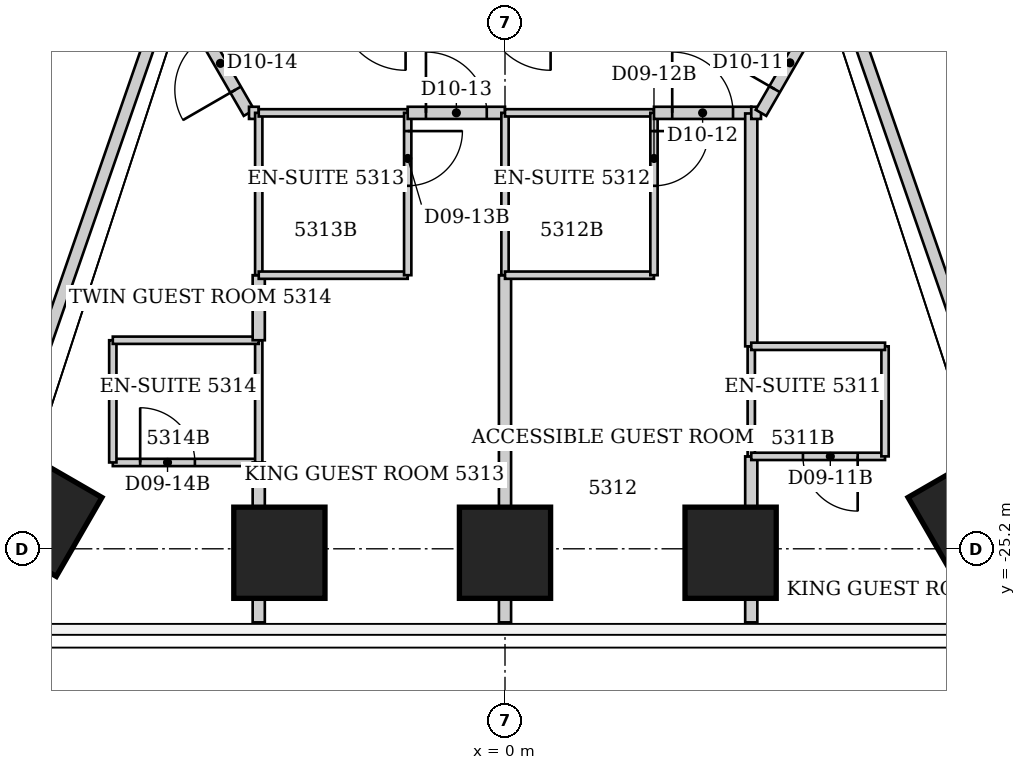
"""IFC4 building model, lengths in metres.
Left out: names, types, materials, properties, quantities, classifications, styles, units other than length and angle.
Written with IfcOpenShell. Run it as: python <this file> out.ifc"""

import sys

from ifc_helpers import new_model, si_unit, direction, frame, frame_2d, origin, origin_2d, place, context, subcontext, project, spatial, rectangle, extrude, element, fill, save


model = new_model("IFC4")
c1 = context("Model", 3, precision=1e-05, world=origin(), true_north=direction((0.0, 1.0)))
c2 = subcontext(c1, "Body", "Model", "MODEL_VIEW")
j1 = project(units=[si_unit("LENGTHUNIT", "METRE"), si_unit("PLANEANGLEUNIT", "RADIAN")], contexts=[c1])
p1 = place(None, origin())
s1 = spatial("IfcSite", under=j1, at=p1, CompositionType="ELEMENT")
p2 = place(p1, origin())
s2 = spatial("IfcBuilding", under=s1, at=p2, CompositionType="ELEMENT")
p3 = place(p2, frame((0.0, 0.0, 213.6)))
s3 = spatial("IfcBuildingStorey", under=s2, at=p3, CompositionType="ELEMENT", Elevation=213.6)
p4 = place(p3, frame((7.979, -24.442, 0.0), z_axis=(0.0, 0.0, 1.0), x_axis=(0.5, -0.866025403784, 0.0)))
e1 = element("IfcColumn", 1, at=p4, inside=s3, PredefinedType="COLUMN", context=c2, shape_type="SweptSolid", body=[
    extrude(rectangle(XDim=1.5, YDim=2.25, at=origin_2d()), origin(), (0.0, 0.0, 1.0), 3.8),
])
for number, where, z_axis, x_axis in (
    (2, (3.71, -25.265, 0.0), (0.0, 0.0, 1.0), (0.0, -1.0, 0.0)),
    (3, (0.0, -25.265, 0.0), (0.0, 0.0, 1.0), (0.0, -1.0, 0.0)),
    (4, (-3.71, -25.265, 0.0), (0.0, 0.0, 1.0), (0.0, -1.0, 0.0)),
):
    element("IfcColumn", number, at=place(p3, frame(where, z_axis=z_axis, x_axis=x_axis)), inside=s3, PredefinedType="COLUMN", context=c2, shape_type="SweptSolid", body=[
        extrude(rectangle(XDim=1.5, YDim=1.5, at=origin_2d()), origin(), (0.0, 0.0, 1.0), 3.8),
    ])
p5 = place(p3, frame((-7.979, -24.442, 0.0), z_axis=(0.0, 0.0, 1.0), x_axis=(-0.5, -0.866025403784, 0.0)))
e5 = element("IfcColumn", 5, at=p5, inside=s3, PredefinedType="COLUMN", context=c2, shape_type="SweptSolid", body=[
    extrude(rectangle(XDim=1.5, YDim=2.25, at=origin_2d()), origin(), (0.0, 0.0, 1.0), 3.8),
])
p6 = place(p3, frame((-9.01, -26.012, 0.0), z_axis=(0.0, 0.0, 1.0), x_axis=(0.327582991606, 0.944822408504, 0.0)))
e6 = element("IfcWall", 6, at=p6, inside=s3, PredefinedType="PARTITIONING", context=c2, shape_type="SweptSolid", body=[
    extrude(rectangle(XDim=10.667, YDim=0.2, at=frame_2d((5.333, 0.0))), origin(), (0.0, 0.0, 1.0), 3.64),
])
p7 = place(p3, frame((-6.45, -23.78, 0.0), z_axis=(0.0, 0.0, 1.0), x_axis=(1.0, 0.0, 0.0)))
e7 = element("IfcWall", 7, at=p7, inside=s3, PredefinedType="PARTITIONING", context=c2, shape_type="SweptSolid", body=[
    extrude(rectangle(XDim=2.4, YDim=0.12, at=frame_2d((1.2, 0.0))), origin(), (0.0, 0.0, 1.0), 3.64),
])
p8 = place(p7, frame((0.45, 0.0, 0.0)))
e8 = element("IfcOpeningElement", 8, at=p8, cuts=e7, PredefinedType="OPENING", context=c2, shape_type="SweptSolid", body=[
    extrude(rectangle(XDim=0.9, YDim=2.03, at=frame_2d((0.45, 1.015))), frame((0.0, 0.06, 0.0), z_axis=(0.0, -1.0, 0.0), x_axis=(1.0, 0.0, 0.0)), (0.0, 0.0, 1.0), 0.12),
])
p9 = place(p3, frame((-6.45, -21.77, 0.0), z_axis=(0.0, 0.0, 1.0), x_axis=(0.0, -1.0, 0.0)))
e9 = element("IfcWall", 9, at=p9, inside=s3, PredefinedType="PARTITIONING", context=c2, shape_type="SweptSolid", body=[
    extrude(rectangle(XDim=2.01, YDim=0.12, at=frame_2d((1.005, 0.0))), origin(), (0.0, 0.0, 1.0), 3.64),
])
p10 = place(p3, frame((-5.48, -15.83, 0.0), z_axis=(0.0, 0.0, 1.0), x_axis=(0.499963722229, -0.866046347752, 0.0)))
e10 = element("IfcWall", 10, at=p10, inside=s3, PredefinedType="PARTITIONING", context=c2, shape_type="SweptSolid", body=[
    extrude(rectangle(XDim=2.54, YDim=0.2, at=frame_2d((1.27, 0.0))), origin(), (0.0, 0.0, 1.0), 3.64),
])
p11 = place(p10, frame((1.1, 0.0, 0.0)))
e11 = element("IfcOpeningElement", 11, at=p11, cuts=e10, PredefinedType="OPENING", context=c2, shape_type="SweptSolid", body=[
    extrude(rectangle(XDim=1.0, YDim=2.13, at=frame_2d((0.5, 1.065))), frame((0.0, 0.1, 0.0), z_axis=(0.0, -1.0, 0.0), x_axis=(1.0, 0.0, 0.0)), (0.0, 0.0, 1.0), 0.2),
])
p12 = place(p3, frame((-4.21, -18.03, 0.0), z_axis=(0.0, 0.0, 1.0), x_axis=(1.0, 0.0, 0.0)))
e12 = element("IfcWall", 12, at=p12, inside=s3, PredefinedType="PARTITIONING", context=c2, shape_type="SweptSolid", body=[
    extrude(rectangle(XDim=0.16, YDim=0.2, at=frame_2d((0.08, 0.0))), origin(), (0.0, 0.0, 1.0), 3.64),
])
p13 = place(p3, frame((-4.05, -26.41, 0.0), z_axis=(0.0, 0.0, 1.0), x_axis=(0.0, 1.0, 0.0)))
e13 = element("IfcWall", 13, at=p13, inside=s3, PredefinedType="PARTITIONING", context=c2, shape_type="SweptSolid", body=[
    extrude(rectangle(XDim=2.63, YDim=0.2, at=frame_2d((1.315, 0.0))), origin(), (0.0, 0.0, 1.0), 3.64),
])
p14 = place(p3, frame((-4.05, -23.78, 0.0), z_axis=(0.0, 0.0, 1.0), x_axis=(0.0, 1.0, 0.0)))
e14 = element("IfcWall", 14, at=p14, inside=s3, PredefinedType="PARTITIONING", context=c2, shape_type="SweptSolid", body=[
    extrude(rectangle(XDim=2.01, YDim=0.12, at=frame_2d((1.005, 0.0))), origin(), (0.0, 0.0, 1.0), 3.64),
])
p15 = place(p3, frame((-4.05, -21.77, 0.0), z_axis=(0.0, 0.0, 1.0), x_axis=(-1.0, 0.0, 0.0)))
e15 = element("IfcWall", 15, at=p15, inside=s3, PredefinedType="PARTITIONING", context=c2, shape_type="SweptSolid", body=[
    extrude(rectangle(XDim=2.4, YDim=0.12, at=frame_2d((1.2, 0.0))), origin(), (0.0, 0.0, 1.0), 3.64),
])
p16 = place(p3, frame((-4.05, -21.77, 0.0), z_axis=(0.0, 0.0, 1.0), x_axis=(0.0, 1.0, 0.0)))
e16 = element("IfcWall", 16, at=p16, inside=s3, PredefinedType="PARTITIONING", context=c2, shape_type="SweptSolid", body=[
    extrude(rectangle(XDim=1.07, YDim=0.2, at=frame_2d((0.535, 0.0))), origin(), (0.0, 0.0, 1.0), 3.64),
])
p17 = place(p3, frame((-4.05, -20.7, 0.0), z_axis=(0.0, 0.0, 1.0), x_axis=(0.0, 1.0, 0.0)))
e17 = element("IfcWall", 17, at=p17, inside=s3, PredefinedType="PARTITIONING", context=c2, shape_type="SweptSolid", body=[
    extrude(rectangle(XDim=2.67, YDim=0.12, at=frame_2d((1.335, 0.0))), origin(), (0.0, 0.0, 1.0), 3.64),
])
for number, where, z_axis, x_axis in (
    (18, (-4.05, -20.7, 0.0), (0.0, 0.0, 1.0), (1.0, 0.0, 0.0)),
    (19, (-4.05, -18.03, 0.0), (0.0, 0.0, 1.0), (1.0, 0.0, 0.0)),
):
    element("IfcWall", number, at=place(p3, frame(where, z_axis=z_axis, x_axis=x_axis)), inside=s3, PredefinedType="PARTITIONING", context=c2, shape_type="SweptSolid", body=[
        extrude(rectangle(XDim=2.45, YDim=0.12, at=frame_2d((1.225, 0.0))), origin(), (0.0, 0.0, 1.0), 3.64),
    ])
p18 = place(p3, frame((-1.6, -20.7, 0.0), z_axis=(0.0, 0.0, 1.0), x_axis=(0.0, 1.0, 0.0)))
e20 = element("IfcWall", 20, at=p18, inside=s3, PredefinedType="PARTITIONING", context=c2, shape_type="SweptSolid", body=[
    extrude(rectangle(XDim=2.67, YDim=0.12, at=frame_2d((1.335, 0.0))), origin(), (0.0, 0.0, 1.0), 3.64),
])
p19 = place(p18, frame((1.47, 0.0, 0.0)))
e21 = element("IfcOpeningElement", 21, at=p19, cuts=e20, PredefinedType="OPENING", context=c2, shape_type="SweptSolid", body=[
    extrude(rectangle(XDim=0.9, YDim=2.03, at=frame_2d((0.45, 1.015))), frame((0.0, 0.06, 0.0), z_axis=(0.0, -1.0, 0.0), x_axis=(1.0, 0.0, 0.0)), (0.0, 0.0, 1.0), 0.12),
])
p20 = place(p3, frame((-1.6, -18.03, 0.0), z_axis=(0.0, 0.0, 1.0), x_axis=(1.0, 0.0, 0.0)))
e22 = element("IfcWall", 22, at=p20, inside=s3, PredefinedType="PARTITIONING", context=c2, shape_type="SweptSolid", body=[
    extrude(rectangle(XDim=1.6, YDim=0.2, at=frame_2d((0.8, 0.0))), origin(), (0.0, 0.0, 1.0), 3.64),
])
p21 = place(p20, frame((0.3, 0.0, 0.0)))
e23 = element("IfcOpeningElement", 23, at=p21, cuts=e22, PredefinedType="OPENING", context=c2, shape_type="SweptSolid", body=[
    extrude(rectangle(XDim=1.0, YDim=2.13, at=frame_2d((0.5, 1.065))), frame((0.0, 0.1, 0.0), z_axis=(0.0, -1.0, 0.0), x_axis=(1.0, 0.0, 0.0)), (0.0, 0.0, 1.0), 0.2),
])
p22 = place(p3, frame((0.0, -26.41, 0.0), z_axis=(0.0, 0.0, 1.0), x_axis=(0.0, 1.0, 0.0)))
e24 = element("IfcWall", 24, at=p22, inside=s3, PredefinedType="PARTITIONING", context=c2, shape_type="SweptSolid", body=[
    extrude(rectangle(XDim=5.71, YDim=0.2, at=frame_2d((2.855, 0.0))), origin(), (0.0, 0.0, 1.0), 2.726),
])
p23 = place(p3, frame((0.0, -20.7, 0.0), z_axis=(0.0, 0.0, 1.0), x_axis=(0.0, 1.0, 0.0)))
e25 = element("IfcWall", 25, at=p23, inside=s3, PredefinedType="PARTITIONING", context=c2, shape_type="SweptSolid", body=[
    extrude(rectangle(XDim=2.67, YDim=0.12, at=frame_2d((1.335, 0.0))), origin(), (0.0, 0.0, 1.0), 2.726),
])
for number, where, z_axis, x_axis in (
    (26, (0.0, -20.7, 0.0), (0.0, 0.0, 1.0), (1.0, 0.0, 0.0)),
    (27, (0.0, -18.03, 0.0), (0.0, 0.0, 1.0), (1.0, 0.0, 0.0)),
):
    element("IfcWall", number, at=place(p3, frame(where, z_axis=z_axis, x_axis=x_axis)), inside=s3, PredefinedType="PARTITIONING", context=c2, shape_type="SweptSolid", body=[
        extrude(rectangle(XDim=2.45, YDim=0.12, at=frame_2d((1.225, 0.0))), origin(), (0.0, 0.0, 1.0), 3.64),
    ])
p24 = place(p3, frame((2.45, -20.7, 0.0), z_axis=(0.0, 0.0, 1.0), x_axis=(0.0, 1.0, 0.0)))
e28 = element("IfcWall", 28, at=p24, inside=s3, PredefinedType="PARTITIONING", context=c2, shape_type="SweptSolid", body=[
    extrude(rectangle(XDim=2.67, YDim=0.12, at=frame_2d((1.335, 0.0))), origin(), (0.0, 0.0, 1.0), 3.64),
])
p25 = place(p24, frame((1.47, 0.0, 0.0)))
e29 = element("IfcOpeningElement", 29, at=p25, cuts=e28, PredefinedType="OPENING", context=c2, shape_type="SweptSolid", body=[
    extrude(rectangle(XDim=0.9, YDim=2.03, at=frame_2d((0.45, 1.015))), frame((0.0, 0.06, 0.0), z_axis=(0.0, -1.0, 0.0), x_axis=(1.0, 0.0, 0.0)), (0.0, 0.0, 1.0), 0.12),
])
p26 = place(p3, frame((2.45, -18.03, 0.0), z_axis=(0.0, 0.0, 1.0), x_axis=(1.0, 0.0, 0.0)))
e30 = element("IfcWall", 30, at=p26, inside=s3, PredefinedType="PARTITIONING", context=c2, shape_type="SweptSolid", body=[
    extrude(rectangle(XDim=1.6, YDim=0.2, at=frame_2d((0.8, 0.0))), origin(), (0.0, 0.0, 1.0), 3.64),
])
p27 = place(p26, frame((0.3, 0.0, 0.0)))
e31 = element("IfcOpeningElement", 31, at=p27, cuts=e30, PredefinedType="OPENING", context=c2, shape_type="SweptSolid", body=[
    extrude(rectangle(XDim=1.0, YDim=2.13, at=frame_2d((0.5, 1.065))), frame((0.0, 0.1, 0.0), z_axis=(0.0, -1.0, 0.0), x_axis=(1.0, 0.0, 0.0)), (0.0, 0.0, 1.0), 0.2),
])
p28 = place(p3, frame((4.05, -26.41, 0.0), z_axis=(0.0, 0.0, 1.0), x_axis=(0.0, 1.0, 0.0)))
e32 = element("IfcWall", 32, at=p28, inside=s3, PredefinedType="PARTITIONING", context=c2, shape_type="SweptSolid", body=[
    extrude(rectangle(XDim=2.73, YDim=0.2, at=frame_2d((1.365, 0.0))), origin(), (0.0, 0.0, 1.0), 3.64),
])
p29 = place(p3, frame((4.05, -23.68, 0.0), z_axis=(0.0, 0.0, 1.0), x_axis=(0.0, 1.0, 0.0)))
e33 = element("IfcWall", 33, at=p29, inside=s3, PredefinedType="PARTITIONING", context=c2, shape_type="SweptSolid", body=[
    extrude(rectangle(XDim=1.81, YDim=0.12, at=frame_2d((0.905, 0.0))), origin(), (0.0, 0.0, 1.0), 3.64),
])
p30 = place(p3, frame((4.05, -23.68, 0.0), z_axis=(0.0, 0.0, 1.0), x_axis=(1.0, 0.0, 0.0)))
e34 = element("IfcWall", 34, at=p30, inside=s3, PredefinedType="PARTITIONING", context=c2, shape_type="SweptSolid", body=[
    extrude(rectangle(XDim=2.2, YDim=0.12, at=frame_2d((1.1, 0.0))), origin(), (0.0, 0.0, 1.0), 3.64),
])
p31 = place(p30, frame((0.85, 0.0, 0.0)))
e35 = element("IfcOpeningElement", 35, at=p31, cuts=e34, PredefinedType="OPENING", context=c2, shape_type="SweptSolid", body=[
    extrude(rectangle(XDim=0.9, YDim=2.03, at=frame_2d((0.45, 1.015))), frame((0.0, 0.06, 0.0), z_axis=(0.0, -1.0, 0.0), x_axis=(1.0, 0.0, 0.0)), (0.0, 0.0, 1.0), 0.12),
])
p32 = place(p3, frame((4.05, -21.87, 0.0), z_axis=(0.0, 0.0, 1.0), x_axis=(0.0, 1.0, 0.0)))
e36 = element("IfcWall", 36, at=p32, inside=s3, PredefinedType="PARTITIONING", context=c2, shape_type="SweptSolid", body=[
    extrude(rectangle(XDim=3.83, YDim=0.2, at=frame_2d((1.915, 0.0))), origin(), (0.0, 0.0, 1.0), 3.64),
])
p33 = place(p3, frame((4.05, -18.03, 0.0), z_axis=(0.0, 0.0, 1.0), x_axis=(1.0, 0.0, 0.0)))
e37 = element("IfcWall", 37, at=p33, inside=s3, PredefinedType="PARTITIONING", context=c2, shape_type="SweptSolid", body=[
    extrude(rectangle(XDim=0.16, YDim=0.2, at=frame_2d((0.08, 0.0))), origin(), (0.0, 0.0, 1.0), 3.64),
])
p34 = place(p3, frame((4.21, -18.03, 0.0), z_axis=(0.0, 0.0, 1.0), x_axis=(0.499963722229, 0.866046347752, 0.0)))
e38 = element("IfcWall", 38, at=p34, inside=s3, PredefinedType="PARTITIONING", context=c2, shape_type="SweptSolid", body=[
    extrude(rectangle(XDim=2.54, YDim=0.2, at=frame_2d((1.27, 0.0))), origin(), (0.0, 0.0, 1.0), 3.64),
])
p35 = place(p34, frame((0.45, 0.0, 0.0)))
e39 = element("IfcOpeningElement", 39, at=p35, cuts=e38, PredefinedType="OPENING", context=c2, shape_type="SweptSolid", body=[
    extrude(rectangle(XDim=1.0, YDim=2.13, at=frame_2d((0.5, 1.065))), frame((0.0, 0.1, 0.0), z_axis=(0.0, -1.0, 0.0), x_axis=(1.0, 0.0, 0.0)), (0.0, 0.0, 1.0), 0.2),
])
p36 = place(p3, frame((5.515, -15.932, 0.0), z_axis=(0.0, 0.0, 1.0), x_axis=(0.327594697431, -0.944818349851, 0.0)))
e40 = element("IfcWall", 40, at=p36, inside=s3, PredefinedType="PARTITIONING", context=c2, shape_type="SweptSolid", body=[
    extrude(rectangle(XDim=10.668, YDim=0.2, at=frame_2d((5.334, 0.0))), origin(), (0.0, 0.0, 1.0), 3.64),
])
p37 = place(p3, frame((5.615, -15.975, 0.0), z_axis=(0.0, 0.0, 1.0), x_axis=(0.864873056518, -0.501990633487, 0.0)))
e41 = element("IfcWall", 41, at=p37, inside=s3, PredefinedType="PARTITIONING", context=c2, shape_type="SweptSolid", body=[
    extrude(rectangle(XDim=2.48, YDim=0.12, at=frame_2d((1.24, 0.0))), origin(), (0.0, 0.0, 1.0), 3.038),
])
p38 = place(p3, frame((6.25, -23.68, 0.0), z_axis=(0.0, 0.0, 1.0), x_axis=(0.0, 1.0, 0.0)))
e42 = element("IfcWall", 42, at=p38, inside=s3, PredefinedType="PARTITIONING", context=c2, shape_type="SweptSolid", body=[
    extrude(rectangle(XDim=1.81, YDim=0.12, at=frame_2d((0.905, 0.0))), origin(), (0.0, 0.0, 1.0), 3.64),
])
p39 = place(p3, frame((6.25, -21.87, 0.0), z_axis=(0.0, 0.0, 1.0), x_axis=(-1.0, 0.0, 0.0)))
e43 = element("IfcWall", 43, at=p39, inside=s3, PredefinedType="PARTITIONING", context=c2, shape_type="SweptSolid", body=[
    extrude(rectangle(XDim=2.2, YDim=0.12, at=frame_2d((1.1, 0.0))), origin(), (0.0, 0.0, 1.0), 3.64),
])
p40 = place(p35, origin())
e44 = element("IfcDoor", 44, at=p40, inside=s3, OperationType="SINGLE_SWING_LEFT", PredefinedType="DOOR", context=c2, shape_type="SweptSolid", body=[
    extrude(rectangle(XDim=1.0, YDim=2.13, at=frame_2d((0.5, 1.065))), frame((0.0, 0.025, 0.0), z_axis=(0.0, -1.0, 0.0), x_axis=(1.0, 0.0, 0.0)), (0.0, 0.0, 1.0), 0.05),
])
fill(e39, e44)
p41 = place(p31, origin())
e45 = element("IfcDoor", 45, at=p41, inside=s3, OperationType="SINGLE_SWING_RIGHT", PredefinedType="DOOR", context=c2, shape_type="SweptSolid", body=[
    extrude(rectangle(XDim=0.9, YDim=2.03, at=frame_2d((0.45, 1.015))), frame((0.0, 0.025, 0.0), z_axis=(0.0, -1.0, 0.0), x_axis=(1.0, 0.0, 0.0)), (0.0, 0.0, 1.0), 0.05),
])
fill(e35, e45)
p42 = place(p27, origin())
e46 = element("IfcDoor", 46, at=p42, inside=s3, OperationType="SINGLE_SWING_LEFT", PredefinedType="DOOR", context=c2, shape_type="SweptSolid", body=[
    extrude(rectangle(XDim=1.0, YDim=2.13, at=frame_2d((0.5, 1.065))), frame((0.0, 0.025, 0.0), z_axis=(0.0, -1.0, 0.0), x_axis=(1.0, 0.0, 0.0)), (0.0, 0.0, 1.0), 0.05),
])
fill(e31, e46)
p43 = place(p25, origin())
e47 = element("IfcDoor", 47, at=p43, inside=s3, OperationType="SINGLE_SWING_RIGHT", PredefinedType="DOOR", context=c2, shape_type="SweptSolid", body=[
    extrude(rectangle(XDim=0.9, YDim=2.03, at=frame_2d((0.45, 1.015))), frame((0.0, 0.025, 0.0), z_axis=(0.0, -1.0, 0.0), x_axis=(1.0, 0.0, 0.0)), (0.0, 0.0, 1.0), 0.05),
])
fill(e29, e47)
p44 = place(p21, origin())
e48 = element("IfcDoor", 48, at=p44, inside=s3, OperationType="SINGLE_SWING_LEFT", PredefinedType="DOOR", context=c2, shape_type="SweptSolid", body=[
    extrude(rectangle(XDim=1.0, YDim=2.13, at=frame_2d((0.5, 1.065))), frame((0.0, 0.025, 0.0), z_axis=(0.0, -1.0, 0.0), x_axis=(1.0, 0.0, 0.0)), (0.0, 0.0, 1.0), 0.05),
])
fill(e23, e48)
p45 = place(p19, origin())
e49 = element("IfcDoor", 49, at=p45, inside=s3, OperationType="SINGLE_SWING_RIGHT", PredefinedType="DOOR", context=c2, shape_type="SweptSolid", body=[
    extrude(rectangle(XDim=0.9, YDim=2.03, at=frame_2d((0.45, 1.015))), frame((0.0, 0.025, 0.0), z_axis=(0.0, -1.0, 0.0), x_axis=(1.0, 0.0, 0.0)), (0.0, 0.0, 1.0), 0.05),
])
fill(e21, e49)
p46 = place(p11, origin())
e50 = element("IfcDoor", 50, at=p46, inside=s3, OperationType="SINGLE_SWING_RIGHT", PredefinedType="DOOR", context=c2, shape_type="SweptSolid", body=[
    extrude(rectangle(XDim=1.0, YDim=2.13, at=frame_2d((0.5, 1.065))), frame((0.0, 0.025, 0.0), z_axis=(0.0, -1.0, 0.0), x_axis=(1.0, 0.0, 0.0)), (0.0, 0.0, 1.0), 0.05),
])
fill(e11, e50)
p47 = place(p8, origin())
e51 = element("IfcDoor", 51, at=p47, inside=s3, OperationType="SINGLE_SWING_LEFT", PredefinedType="DOOR", context=c2, shape_type="SweptSolid", body=[
    extrude(rectangle(XDim=0.9, YDim=2.03, at=frame_2d((0.45, 1.015))), frame((0.0, 0.025, 0.0), z_axis=(0.0, -1.0, 0.0), x_axis=(1.0, 0.0, 0.0)), (0.0, 0.0, 1.0), 0.05),
])
fill(e8, e51)
save(model, sys.argv[1])
